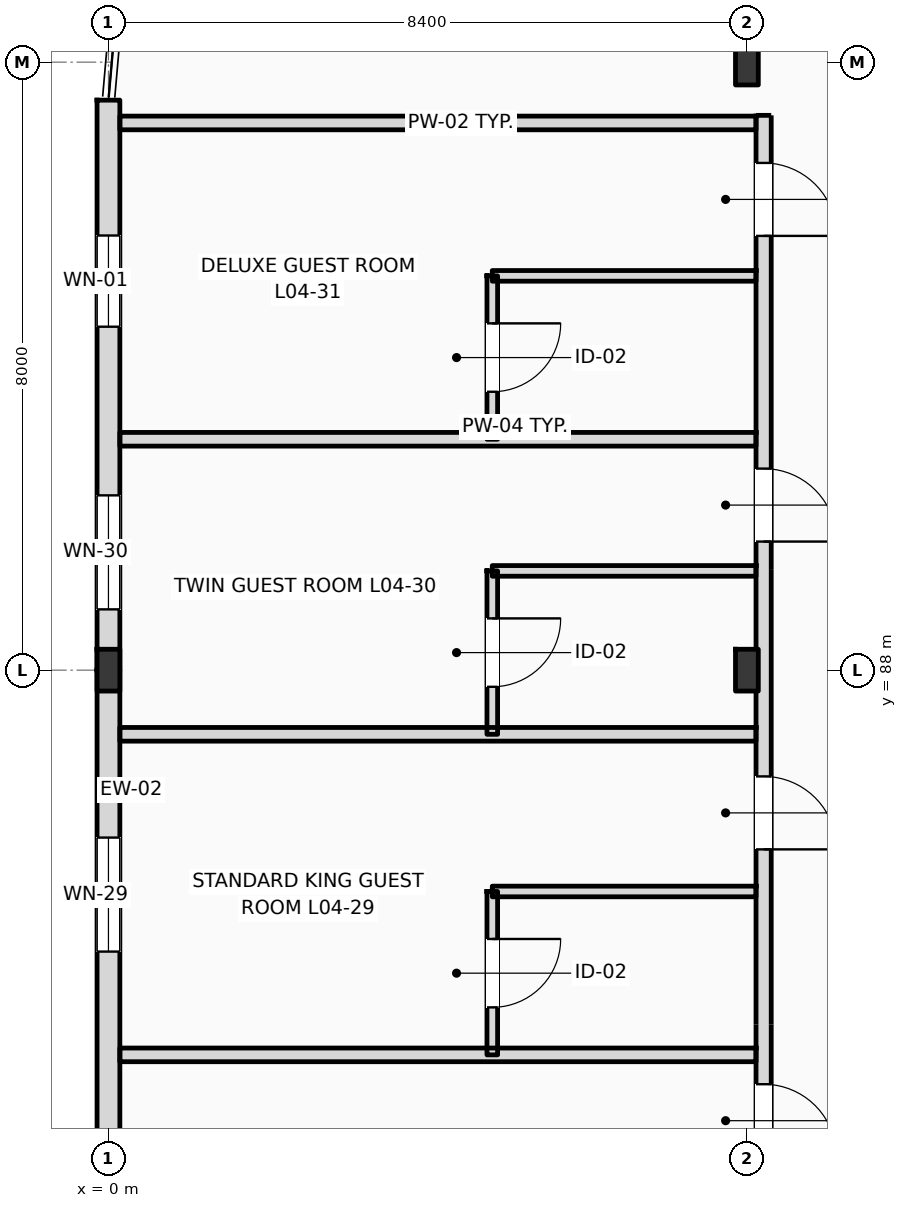
"""IFC4 building model, lengths in metres.
Left out: names, types, materials, properties, quantities, classifications, styles, units other than length and angle.
Written with IfcOpenShell. Run it as: python <this file> out.ifc"""

import sys

from ifc_helpers import new_model, si_unit, direction, frame, frame_2d, origin, origin_2d, place, context, subcontext, project, spatial, rectangle, i_section, extrude, element, fill, save


model = new_model("IFC4")
c1 = context("Model", 3, precision=1e-05, world=origin(), true_north=direction((0.0, 1.0)))
c2 = subcontext(c1, "Body", "Model", "MODEL_VIEW")
j1 = project(units=[si_unit("LENGTHUNIT", "METRE"), si_unit("PLANEANGLEUNIT", "RADIAN")], contexts=[c1])
p1 = place(None, origin())
s1 = spatial("IfcSite", under=j1, at=p1, CompositionType="ELEMENT")
p2 = place(p1, origin())
s2 = spatial("IfcBuilding", under=s1, at=p2, CompositionType="ELEMENT")
p3 = place(p2, frame((0.0, 0.0, 20.4)))
s3 = spatial("IfcBuildingStorey", under=s2, at=p3, CompositionType="ELEMENT", Elevation=20.4)
for number, where, z_axis, x_axis in (
    (1, (0.0, 88.0, 0.0), (0.0, 0.0, 1.0), (1.0, 0.0, 0.0)),
    (2, (8.4, 88.0, 0.0), (0.0, 0.0, 1.0), (1.0, 0.0, 0.0)),
):
    element("IfcColumn", number, at=place(p3, frame(where, z_axis=z_axis, x_axis=x_axis)), inside=s3, PredefinedType="COLUMN", context=c2, shape_type="SweptSolid", body=[
        extrude(i_section(OverallWidth=0.3, OverallDepth=0.55, WebThickness=0.015, FlangeThickness=0.029, FilletRadius=0.027, at=origin_2d()), origin(), (0.0, 0.0, 1.0), 4.2),
    ])
p4 = place(p3, frame((8.4, 96.0, 0.0), z_axis=(0.0, 0.0, 1.0), x_axis=(1.0, 0.0, 0.0)))
e3 = element("IfcColumn", 3, at=p4, inside=s3, PredefinedType="COLUMN", context=c2, shape_type="SweptSolid", body=[
    extrude(i_section(OverallWidth=0.3, OverallDepth=0.6, WebThickness=0.015, FlangeThickness=0.03, FilletRadius=0.027, at=origin_2d()), origin(), (0.0, 0.0, 1.0), 4.2),
])
p5 = place(p3, frame((0.0, 79.5, 0.0), z_axis=(0.0, 0.0, 1.0), x_axis=(0.0, 1.0, 0.0)))
e4 = element("IfcWall", 4, at=p5, inside=s3, PredefinedType="STANDARD", context=c2, shape_type="SweptSolid", body=[
    extrude(rectangle(XDim=8.5, YDim=0.3, at=frame_2d((4.25, 0.0))), origin(), (0.0, 0.0, 1.0), 3.53),
])
p6 = place(p5, frame((0.947, 0.0, 0.9)))
e5 = element("IfcOpeningElement", 5, at=p6, cuts=e4, PredefinedType="OPENING", context=c2, shape_type="SweptSolid", body=[
    extrude(rectangle(XDim=1.5, YDim=2.45, at=frame_2d((0.75, 1.225))), frame((0.0, 0.16, 0.0), z_axis=(0.0, -1.0, 0.0), x_axis=(1.0, 0.0, 0.0)), (0.0, 0.0, 1.0), 0.32),
])
p7 = place(p5, frame((4.797, 0.0, 0.9)))
e6 = element("IfcOpeningElement", 6, at=p7, cuts=e4, PredefinedType="OPENING", context=c2, shape_type="SweptSolid", body=[
    extrude(rectangle(XDim=1.5, YDim=2.45, at=frame_2d((0.75, 1.225))), frame((0.0, 0.16, 0.0), z_axis=(0.0, -1.0, 0.0), x_axis=(1.0, 0.0, 0.0)), (0.0, 0.0, 1.0), 0.32),
])
p8 = place(p3, frame((0.0, 88.0, 0.0), z_axis=(0.0, 0.0, 1.0), x_axis=(0.0, 1.0, 0.0)))
e7 = element("IfcWall", 7, at=p8, inside=s3, PredefinedType="STANDARD", context=c2, shape_type="SweptSolid", body=[
    extrude(rectangle(XDim=7.5, YDim=0.3, at=frame_2d((3.75, 0.0))), origin(), (0.0, 0.0, 1.0), 3.94),
])
p9 = place(p8, frame((0.8, 0.0, 0.9)))
e8 = element("IfcOpeningElement", 8, at=p9, cuts=e7, PredefinedType="OPENING", context=c2, shape_type="SweptSolid", body=[
    extrude(rectangle(XDim=1.5, YDim=2.86, at=frame_2d((0.75, 1.43))), frame((0.0, 0.16, 0.0), z_axis=(0.0, -1.0, 0.0), x_axis=(1.0, 0.0, 0.0)), (0.0, 0.0, 1.0), 0.32),
])
p10 = place(p8, frame((4.519, 0.0, 0.9)))
e9 = element("IfcOpeningElement", 9, at=p10, cuts=e7, PredefinedType="OPENING", context=c2, shape_type="SweptSolid", body=[
    extrude(rectangle(XDim=1.2, YDim=1.8, at=frame_2d((0.6, 0.9))), frame((0.0, 0.16, 0.0), z_axis=(0.0, -1.0, 0.0), x_axis=(1.0, 0.0, 0.0)), (0.0, 0.0, 1.0), 0.32),
])
p11 = place(p3, frame((8.62, 62.64, 0.0), z_axis=(0.0, 0.0, 1.0), x_axis=(0.0, 1.0, 0.0)))
e10 = element("IfcWall", 10, at=p11, inside=s3, PredefinedType="PARTITIONING", context=c2, shape_type="SweptSolid", body=[
    extrude(rectangle(XDim=32.66, YDim=0.2, at=frame_2d((16.33, 0.0))), origin(), (0.0, 0.0, 1.0), 3.53),
])
p12 = place(p11, frame((2.724, 0.0, 0.0)))
e11 = element("IfcOpeningElement", 11, at=p12, cuts=e10, PredefinedType="OPENING", context=c2, shape_type="SweptSolid", body=[
    extrude(rectangle(XDim=0.96, YDim=2.2, at=frame_2d((0.48, 1.1))), frame((0.0, 0.11, 0.0), z_axis=(0.0, -1.0, 0.0), x_axis=(1.0, 0.0, 0.0)), (0.0, 0.0, 1.0), 0.22),
])
p13 = place(p11, frame((4.652, 0.0, 0.0)))
e12 = element("IfcOpeningElement", 12, at=p13, cuts=e10, PredefinedType="OPENING", context=c2, shape_type="SweptSolid", body=[
    extrude(rectangle(XDim=0.96, YDim=2.2, at=frame_2d((0.48, 1.1))), frame((0.0, 0.11, 0.0), z_axis=(0.0, -1.0, 0.0), x_axis=(1.0, 0.0, 0.0)), (0.0, 0.0, 1.0), 0.22),
])
p14 = place(p11, frame((10.852, 0.0, 0.0)))
e13 = element("IfcOpeningElement", 13, at=p14, cuts=e10, PredefinedType="OPENING", context=c2, shape_type="SweptSolid", body=[
    extrude(rectangle(XDim=0.96, YDim=2.2, at=frame_2d((0.48, 1.1))), frame((0.0, 0.11, 0.0), z_axis=(0.0, -1.0, 0.0), x_axis=(1.0, 0.0, 0.0)), (0.0, 0.0, 1.0), 0.22),
])
p15 = place(p11, frame((12.752, 0.0, 0.0)))
e14 = element("IfcOpeningElement", 14, at=p15, cuts=e10, PredefinedType="OPENING", context=c2, shape_type="SweptSolid", body=[
    extrude(rectangle(XDim=0.96, YDim=2.2, at=frame_2d((0.48, 1.1))), frame((0.0, 0.11, 0.0), z_axis=(0.0, -1.0, 0.0), x_axis=(1.0, 0.0, 0.0)), (0.0, 0.0, 1.0), 0.22),
])
p16 = place(p11, frame((18.952, 0.0, 0.0)))
e15 = element("IfcOpeningElement", 15, at=p16, cuts=e10, PredefinedType="OPENING", context=c2, shape_type="SweptSolid", body=[
    extrude(rectangle(XDim=0.96, YDim=2.2, at=frame_2d((0.48, 1.1))), frame((0.0, 0.11, 0.0), z_axis=(0.0, -1.0, 0.0), x_axis=(1.0, 0.0, 0.0)), (0.0, 0.0, 1.0), 0.22),
])
p17 = place(p11, frame((23.002, 0.0, 0.0)))
e16 = element("IfcOpeningElement", 16, at=p17, cuts=e10, PredefinedType="OPENING", context=c2, shape_type="SweptSolid", body=[
    extrude(rectangle(XDim=0.96, YDim=2.2, at=frame_2d((0.48, 1.1))), frame((0.0, 0.11, 0.0), z_axis=(0.0, -1.0, 0.0), x_axis=(1.0, 0.0, 0.0)), (0.0, 0.0, 1.0), 0.22),
])
p18 = place(p11, frame((27.052, 0.0, 0.0)))
e17 = element("IfcOpeningElement", 17, at=p18, cuts=e10, PredefinedType="OPENING", context=c2, shape_type="SweptSolid", body=[
    extrude(rectangle(XDim=0.96, YDim=2.2, at=frame_2d((0.48, 1.1))), frame((0.0, 0.11, 0.0), z_axis=(0.0, -1.0, 0.0), x_axis=(1.0, 0.0, 0.0)), (0.0, 0.0, 1.0), 0.22),
])
p19 = place(p11, frame((31.074, 0.0, 0.0)))
e18 = element("IfcOpeningElement", 18, at=p19, cuts=e10, PredefinedType="OPENING", context=c2, shape_type="SweptSolid", body=[
    extrude(rectangle(XDim=0.96, YDim=2.2, at=frame_2d((0.48, 1.1))), frame((0.0, 0.11, 0.0), z_axis=(0.0, -1.0, 0.0), x_axis=(1.0, 0.0, 0.0)), (0.0, 0.0, 1.0), 0.22),
])
for number, where, z_axis, x_axis in (
    (19, (0.15, 82.938, 0.0), (0.0, 0.0, 1.0), (1.0, 0.0, 0.0)),
    (20, (0.15, 87.156, 0.0), (0.0, 0.0, 1.0), (1.0, 0.0, 0.0)),
):
    element("IfcWall", number, at=place(p3, frame(where, z_axis=z_axis, x_axis=x_axis)), inside=s3, PredefinedType="PARTITIONING", context=c2, shape_type="SweptSolid", body=[
        extrude(rectangle(XDim=8.37, YDim=0.18, at=frame_2d((4.185, 0.0))), origin(), (0.0, 0.0, 1.0), 3.94),
    ])
p20 = place(p3, frame((5.05, 85.088, 0.0), z_axis=(0.0, 0.0, 1.0), x_axis=(1.0, 0.0, 0.0)))
e21 = element("IfcWall", 21, at=p20, inside=s3, PredefinedType="PARTITIONING", context=c2, shape_type="SweptSolid", body=[
    extrude(rectangle(XDim=3.47, YDim=0.14, at=frame_2d((1.735, 0.0))), origin(), (0.0, 0.0, 1.0), 3.94),
])
p21 = place(p3, frame((5.05, 82.938, 0.0), z_axis=(0.0, 0.0, 1.0), x_axis=(0.0, 1.0, 0.0)))
e22 = element("IfcWall", 22, at=p21, inside=s3, PredefinedType="PARTITIONING", context=c2, shape_type="SweptSolid", body=[
    extrude(rectangle(XDim=2.15, YDim=0.14, at=frame_2d((1.075, 0.0))), origin(), (0.0, 0.0, 1.0), 3.94),
])
p22 = place(p21, frame((0.625, 0.0, 0.0)))
e23 = element("IfcOpeningElement", 23, at=p22, cuts=e22, PredefinedType="OPENING", context=c2, shape_type="SweptSolid", body=[
    extrude(rectangle(XDim=0.9, YDim=2.1, at=frame_2d((0.45, 1.05))), frame((0.0, 0.08, 0.0), z_axis=(0.0, -1.0, 0.0), x_axis=(1.0, 0.0, 0.0)), (0.0, 0.0, 1.0), 0.16),
])
p23 = place(p3, frame((0.15, 91.038, 0.0), z_axis=(0.0, 0.0, 1.0), x_axis=(1.0, 0.0, 0.0)))
e24 = element("IfcWall", 24, at=p23, inside=s3, PredefinedType="PARTITIONING", context=c2, shape_type="SweptSolid", body=[
    extrude(rectangle(XDim=8.37, YDim=0.18, at=frame_2d((4.185, 0.0))), origin(), (0.0, 0.0, 1.0), 3.94),
])
p24 = place(p3, frame((5.05, 89.306, 0.0), z_axis=(0.0, 0.0, 1.0), x_axis=(1.0, 0.0, 0.0)))
e25 = element("IfcWall", 25, at=p24, inside=s3, PredefinedType="PARTITIONING", context=c2, shape_type="SweptSolid", body=[
    extrude(rectangle(XDim=3.47, YDim=0.14, at=frame_2d((1.735, 0.0))), origin(), (0.0, 0.0, 1.0), 3.94),
])
p25 = place(p3, frame((5.05, 87.156, 0.0), z_axis=(0.0, 0.0, 1.0), x_axis=(0.0, 1.0, 0.0)))
e26 = element("IfcWall", 26, at=p25, inside=s3, PredefinedType="PARTITIONING", context=c2, shape_type="SweptSolid", body=[
    extrude(rectangle(XDim=2.15, YDim=0.14, at=frame_2d((1.075, 0.0))), origin(), (0.0, 0.0, 1.0), 3.94),
])
p26 = place(p25, frame((0.625, 0.0, 0.0)))
e27 = element("IfcOpeningElement", 27, at=p26, cuts=e26, PredefinedType="OPENING", context=c2, shape_type="SweptSolid", body=[
    extrude(rectangle(XDim=0.9, YDim=2.1, at=frame_2d((0.45, 1.05))), frame((0.0, 0.08, 0.0), z_axis=(0.0, -1.0, 0.0), x_axis=(1.0, 0.0, 0.0)), (0.0, 0.0, 1.0), 0.16),
])
p27 = place(p3, frame((0.15, 95.2, 0.0), z_axis=(0.0, 0.0, 1.0), x_axis=(1.0, 0.0, 0.0)))
e28 = element("IfcWall", 28, at=p27, inside=s3, PredefinedType="PARTITIONING", context=c2, shape_type="SweptSolid", body=[
    extrude(rectangle(XDim=8.37, YDim=0.18, at=frame_2d((4.185, 0.0))), origin(), (0.0, 0.0, 1.0), 3.94),
])
p28 = place(p3, frame((5.05, 93.188, 0.0), z_axis=(0.0, 0.0, 1.0), x_axis=(1.0, 0.0, 0.0)))
e29 = element("IfcWall", 29, at=p28, inside=s3, PredefinedType="PARTITIONING", context=c2, shape_type="SweptSolid", body=[
    extrude(rectangle(XDim=3.47, YDim=0.14, at=frame_2d((1.735, 0.0))), origin(), (0.0, 0.0, 1.0), 3.94),
])
p29 = place(p3, frame((5.05, 91.038, 0.0), z_axis=(0.0, 0.0, 1.0), x_axis=(0.0, 1.0, 0.0)))
e30 = element("IfcWall", 30, at=p29, inside=s3, PredefinedType="PARTITIONING", context=c2, shape_type="SweptSolid", body=[
    extrude(rectangle(XDim=2.15, YDim=0.14, at=frame_2d((1.075, 0.0))), origin(), (0.0, 0.0, 1.0), 3.94),
])
p30 = place(p29, frame((0.625, 0.0, 0.0)))
e31 = element("IfcOpeningElement", 31, at=p30, cuts=e30, PredefinedType="OPENING", context=c2, shape_type="SweptSolid", body=[
    extrude(rectangle(XDim=0.9, YDim=2.1, at=frame_2d((0.45, 1.05))), frame((0.0, 0.08, 0.0), z_axis=(0.0, -1.0, 0.0), x_axis=(1.0, 0.0, 0.0)), (0.0, 0.0, 1.0), 0.16),
])
p31 = place(p7, origin())
e32 = element("IfcWindow", 32, at=p31, inside=s3, PartitioningType="DOUBLE_PANEL_VERTICAL", PredefinedType="WINDOW", context=c2, shape_type="SweptSolid", body=[
    extrude(rectangle(XDim=1.5, YDim=2.45, at=frame_2d((0.75, 1.225))), frame((0.0, 0.03, 0.0), z_axis=(0.0, -1.0, 0.0), x_axis=(1.0, 0.0, 0.0)), (0.0, 0.0, 1.0), 0.06),
])
fill(e6, e32)
p32 = place(p9, origin())
e33 = element("IfcWindow", 33, at=p32, inside=s3, PartitioningType="DOUBLE_PANEL_VERTICAL", PredefinedType="WINDOW", context=c2, shape_type="SweptSolid", body=[
    extrude(rectangle(XDim=1.5, YDim=2.86, at=frame_2d((0.75, 1.43))), frame((0.0, 0.03, 0.0), z_axis=(0.0, -1.0, 0.0), x_axis=(1.0, 0.0, 0.0)), (0.0, 0.0, 1.0), 0.06),
])
fill(e8, e33)
p33 = place(p10, origin())
e34 = element("IfcWindow", 34, at=p33, inside=s3, PartitioningType="DOUBLE_PANEL_VERTICAL", PredefinedType="WINDOW", context=c2, shape_type="SweptSolid", body=[
    extrude(rectangle(XDim=1.2, YDim=1.8, at=frame_2d((0.6, 0.9))), frame((0.0, 0.03, 0.0), z_axis=(0.0, -1.0, 0.0), x_axis=(1.0, 0.0, 0.0)), (0.0, 0.0, 1.0), 0.06),
])
fill(e9, e34)
p34 = place(p16, frame((0.96, 0.0, 0.0), z_axis=(0.0, 0.0, 1.0), x_axis=(-1.0, 0.0, 0.0)))
e35 = element("IfcDoor", 35, at=p34, inside=s3, OperationType="SINGLE_SWING_LEFT", PredefinedType="DOOR", context=c2, shape_type="SweptSolid", body=[
    extrude(rectangle(XDim=0.96, YDim=2.2, at=frame_2d((0.48, 1.1))), frame((0.0, 0.025, 0.0), z_axis=(0.0, -1.0, 0.0), x_axis=(1.0, 0.0, 0.0)), (0.0, 0.0, 1.0), 0.05),
])
fill(e15, e35)
p35 = place(p17, frame((0.96, 0.0, 0.0), z_axis=(0.0, 0.0, 1.0), x_axis=(-1.0, 0.0, 0.0)))
e36 = element("IfcDoor", 36, at=p35, inside=s3, OperationType="SINGLE_SWING_LEFT", PredefinedType="DOOR", context=c2, shape_type="SweptSolid", body=[
    extrude(rectangle(XDim=0.96, YDim=2.2, at=frame_2d((0.48, 1.1))), frame((0.0, 0.025, 0.0), z_axis=(0.0, -1.0, 0.0), x_axis=(1.0, 0.0, 0.0)), (0.0, 0.0, 1.0), 0.05),
])
fill(e16, e36)
p36 = place(p22, frame((0.9, 0.0, 0.0), z_axis=(0.0, 0.0, 1.0), x_axis=(-1.0, 0.0, 0.0)))
e37 = element("IfcDoor", 37, at=p36, inside=s3, OperationType="SINGLE_SWING_RIGHT", PredefinedType="DOOR", context=c2, shape_type="SweptSolid", body=[
    extrude(rectangle(XDim=0.9, YDim=2.1, at=frame_2d((0.45, 1.05))), frame((0.0, 0.025, 0.0), z_axis=(0.0, -1.0, 0.0), x_axis=(1.0, 0.0, 0.0)), (0.0, 0.0, 1.0), 0.05),
])
fill(e23, e37)
p37 = place(p18, frame((0.96, 0.0, 0.0), z_axis=(0.0, 0.0, 1.0), x_axis=(-1.0, 0.0, 0.0)))
e38 = element("IfcDoor", 38, at=p37, inside=s3, OperationType="SINGLE_SWING_LEFT", PredefinedType="DOOR", context=c2, shape_type="SweptSolid", body=[
    extrude(rectangle(XDim=0.96, YDim=2.2, at=frame_2d((0.48, 1.1))), frame((0.0, 0.025, 0.0), z_axis=(0.0, -1.0, 0.0), x_axis=(1.0, 0.0, 0.0)), (0.0, 0.0, 1.0), 0.05),
])
fill(e17, e38)
p38 = place(p26, frame((0.9, 0.0, 0.0), z_axis=(0.0, 0.0, 1.0), x_axis=(-1.0, 0.0, 0.0)))
e39 = element("IfcDoor", 39, at=p38, inside=s3, OperationType="SINGLE_SWING_RIGHT", PredefinedType="DOOR", context=c2, shape_type="SweptSolid", body=[
    extrude(rectangle(XDim=0.9, YDim=2.1, at=frame_2d((0.45, 1.05))), frame((0.0, 0.025, 0.0), z_axis=(0.0, -1.0, 0.0), x_axis=(1.0, 0.0, 0.0)), (0.0, 0.0, 1.0), 0.05),
])
fill(e27, e39)
p39 = place(p19, frame((0.96, 0.0, 0.0), z_axis=(0.0, 0.0, 1.0), x_axis=(-1.0, 0.0, 0.0)))
e40 = element("IfcDoor", 40, at=p39, inside=s3, OperationType="SINGLE_SWING_LEFT", PredefinedType="DOOR", context=c2, shape_type="SweptSolid", body=[
    extrude(rectangle(XDim=0.96, YDim=2.2, at=frame_2d((0.48, 1.1))), frame((0.0, 0.025, 0.0), z_axis=(0.0, -1.0, 0.0), x_axis=(1.0, 0.0, 0.0)), (0.0, 0.0, 1.0), 0.05),
])
fill(e18, e40)
p40 = place(p30, frame((0.9, 0.0, 0.0), z_axis=(0.0, 0.0, 1.0), x_axis=(-1.0, 0.0, 0.0)))
e41 = element("IfcDoor", 41, at=p40, inside=s3, OperationType="SINGLE_SWING_RIGHT", PredefinedType="DOOR", context=c2, shape_type="SweptSolid", body=[
    extrude(rectangle(XDim=0.9, YDim=2.1, at=frame_2d((0.45, 1.05))), frame((0.0, 0.025, 0.0), z_axis=(0.0, -1.0, 0.0), x_axis=(1.0, 0.0, 0.0)), (0.0, 0.0, 1.0), 0.05),
])
fill(e31, e41)
save(model, sys.argv[1])
